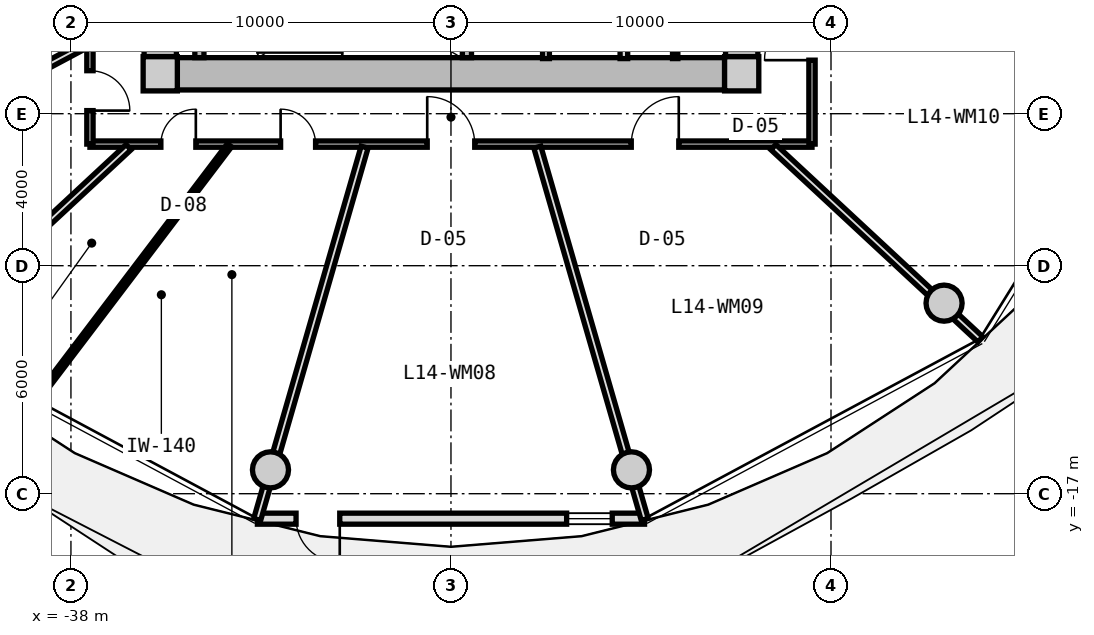
"""IFC4 building model, lengths in metres.
Left out: names, types, materials, properties, quantities, classifications, styles, units other than length and angle.
Written with IfcOpenShell. Run it as: python <this file> out.ifc"""

import sys

from ifc_helpers import new_model, si_unit, direction, frame, frame_2d, origin, origin_2d, place, context, subcontext, project, spatial, rectangle, circle, extrude, source, transform, mapped, element, fill, save


model = new_model("IFC4")
c1 = context("Model", 3, precision=1e-05, world=origin(), true_north=direction((0.0, 1.0)))
c2 = subcontext(c1, "Body", "Model", "MODEL_VIEW")
j1 = project(units=[si_unit("LENGTHUNIT", "METRE"), si_unit("PLANEANGLEUNIT", "RADIAN")], contexts=[c1])
p1 = place(None, origin())
s1 = spatial("IfcSite", under=j1, at=p1, CompositionType="ELEMENT")
p2 = place(p1, origin())
s2 = spatial("IfcBuilding", under=s1, at=p2, CompositionType="ELEMENT")
p3 = place(p2, frame((0.0, 0.0, 49.05)))
s3 = spatial("IfcBuildingStorey", under=s2, at=p3, CompositionType="ELEMENT", Elevation=49.05)
m1 = source(origin(), c2, "Body", "SweptSolid", [
    extrude(rectangle(XDim=0.9, YDim=0.9, at=origin_2d()), origin(), (0.0, 0.0, 1.0), 3.05),
])
for number, where, z_axis, x_axis in (
    (1, (-35.65, -5.95, 0.0), (0.0, 0.0, 1.0), (1.0, 0.0, 0.0)),
    (2, (-20.35, -5.95, 0.0), (0.0, 0.0, 1.0), (1.0, 0.0, 0.0)),
):
    element("IfcColumn", number, at=place(p3, frame(where, z_axis=z_axis, x_axis=x_axis)), inside=s3, PredefinedType="COLUMN", context=c2, shape_type="MappedRepresentation", body=[
        mapped(m1, transform((0.0, 0.0, 0.0), x_axis=(1.0, 0.0, 0.0), y_axis=(0.0, 1.0, 0.0), z_axis=(0.0, 0.0, 1.0), scale=1.0)),
    ])
m2 = source(origin(), c2, "Body", "SweptSolid", [
    extrude(rectangle(XDim=14.4, YDim=0.85, at=frame_2d((7.2, 0.0))), origin(), (0.0, 0.0, 1.0), 2.79),
])
p4 = place(p3, frame((-20.8, -5.95, 0.0), z_axis=(0.0, 0.0, 1.0), x_axis=(-1.0, 0.0, 0.0)))
e3 = element("IfcWall", 3, at=p4, inside=s3, PredefinedType="SHEAR", context=c2, shape_type="MappedRepresentation", body=[
    mapped(m2, transform((0.0, 0.0, 0.0), x_axis=(1.0, 0.0, 0.0), y_axis=(0.0, 1.0, 0.0), z_axis=(0.0, 0.0, 1.0), scale=1.0)),
])
m3 = source(origin(), c2, "Body", "SweptSolid", [
    extrude(rectangle(XDim=11.0, YDim=0.85, at=frame_2d((5.5, 0.0))), origin(), (0.0, 0.0, 1.0), 2.79),
])
p5 = place(p3, frame((-35.65, -5.5, 0.0), z_axis=(0.0, 0.0, 1.0), x_axis=(0.0, 1.0, 0.0)))
e4 = element("IfcWall", 4, at=p5, inside=s3, PredefinedType="SHEAR", context=c2, shape_type="MappedRepresentation", body=[
    mapped(m3, transform((0.0, 0.0, 0.0), x_axis=(1.0, 0.0, 0.0), y_axis=(0.0, 1.0, 0.0), z_axis=(0.0, 0.0, 1.0), scale=1.0)),
])
p6 = place(p5, frame((3.8, 0.0, 0.0)))
e5 = element("IfcOpeningElement", 5, at=p6, cuts=e4, PredefinedType="OPENING", context=c2, shape_type="SweptSolid", body=[
    extrude(rectangle(XDim=1.2, YDim=2.15, at=frame_2d((0.6, 1.075))), frame((0.0, 0.435, 0.0), z_axis=(0.0, -1.0, 0.0), x_axis=(1.0, 0.0, 0.0)), (0.0, 0.0, 1.0), 0.87),
])
p7 = place(p3, frame((-20.35, 5.5, 0.0), z_axis=(0.0, 0.0, 1.0), x_axis=(0.0, -1.0, 0.0)))
e6 = element("IfcWall", 6, at=p7, inside=s3, PredefinedType="SHEAR", context=c2, shape_type="MappedRepresentation", body=[
    mapped(m3, transform((0.0, 0.0, 0.0), x_axis=(1.0, 0.0, 0.0), y_axis=(0.0, 1.0, 0.0), z_axis=(0.0, 0.0, 1.0), scale=1.0)),
])
p8 = place(p7, frame((5.65, 0.0, 0.0)))
e7 = element("IfcOpeningElement", 7, at=p8, cuts=e6, PredefinedType="OPENING", context=c2, shape_type="SweptSolid", body=[
    extrude(rectangle(XDim=1.2, YDim=2.15, at=frame_2d((0.6, 1.075))), frame((0.0, 0.435, 0.0), z_axis=(0.0, -1.0, 0.0), x_axis=(1.0, 0.0, 0.0)), (0.0, 0.0, 1.0), 0.87),
])
m4 = source(origin(), c2, "Body", "SweptSolid", [
    extrude(circle(Radius=0.475, at=origin_2d()), origin(), (0.0, 0.0, 1.0), 3.05),
])
for number, where, z_axis, x_axis in (
    (8, (-32.749, -16.373, 0.0), (0.0, 0.0, 1.0), (1.0, 0.0, 0.0)),
    (9, (-23.251, -16.373, 0.0), (0.0, 0.0, 1.0), (1.0, 0.0, 0.0)),
    (10, (-15.025, -11.985, 0.0), (0.0, 0.0, 1.0), (1.0, 0.0, 0.0)),
):
    element("IfcColumn", number, at=place(p3, frame(where, z_axis=z_axis, x_axis=x_axis)), inside=s3, PredefinedType="COLUMN", context=c2, shape_type="MappedRepresentation", body=[
        mapped(m4, transform((0.0, 0.0, 0.0), x_axis=(1.0, 0.0, 0.0), y_axis=(0.0, 1.0, 0.0), z_axis=(0.0, 0.0, 1.0), scale=1.0)),
    ])
m5 = source(origin(), c2, "Body", "SweptSolid", [
    extrude(rectangle(XDim=10.187, YDim=0.29, at=frame_2d((5.094, 0.0))), origin(), (0.0, 0.0, 1.0), 2.79),
])
p9 = place(p3, frame((-22.906, -17.657, 0.0), z_axis=(0.0, 0.0, 1.0), x_axis=(-1.0, 0.0, 0.0)))
e11 = element("IfcWall", 11, at=p9, inside=s3, PredefinedType="SOLIDWALL", context=c2, shape_type="MappedRepresentation", body=[
    mapped(m5, transform((0.0, 0.0, 0.0), x_axis=(1.0, 0.0, 0.0), y_axis=(0.0, 1.0, 0.0), z_axis=(0.0, 0.0, 1.0), scale=1.0)),
])
p10 = place(p9, frame((8.02, 0.0, 0.0)))
e12 = element("IfcOpeningElement", 12, at=p10, cuts=e11, PredefinedType="OPENING", context=c2, shape_type="SweptSolid", body=[
    extrude(rectangle(XDim=1.15, YDim=2.25, at=frame_2d((0.575, 1.125))), frame((0.0, 0.155, 0.0), z_axis=(0.0, -1.0, 0.0), x_axis=(1.0, 0.0, 0.0)), (0.0, 0.0, 1.0), 0.31),
])
p11 = place(p9, frame((0.85, 0.0, 0.85)))
e13 = element("IfcOpeningElement", 13, at=p11, cuts=e11, PredefinedType="OPENING", context=c2, shape_type="SweptSolid", body=[
    extrude(rectangle(XDim=1.2, YDim=1.5, at=frame_2d((0.6, 0.75))), frame((0.0, 0.155, 0.0), z_axis=(0.0, -1.0, 0.0), x_axis=(1.0, 0.0, 0.0)), (0.0, 0.0, 1.0), 0.31),
])
m6 = source(origin(), c2, "Body", "SweptSolid", [
    extrude(rectangle(XDim=3.075, YDim=0.24, at=frame_2d((1.538, 0.0))), origin(), (0.0, 0.0, 1.0), 2.79),
])
for number, where, z_axis, x_axis in (
    (14, (-34.62, -5.525, 0.0), (0.0, 0.0, 1.0), (0.0, 1.0, 0.0)),
    (15, (-27.58, -5.525, 0.0), (0.0, 0.0, 1.0), (0.0, 1.0, 0.0)),
):
    element("IfcWall", number, at=place(p3, frame(where, z_axis=z_axis, x_axis=x_axis)), inside=s3, PredefinedType="PARTITIONING", context=c2, shape_type="MappedRepresentation", body=[
        mapped(m6, transform((0.0, 0.0, 0.0), x_axis=(1.0, 0.0, 0.0), y_axis=(0.0, 1.0, 0.0), z_axis=(0.0, 0.0, 1.0), scale=1.0)),
    ])
m7 = source(origin(), c2, "Body", "SweptSolid", [
    extrude(rectangle(XDim=3.8, YDim=0.2, at=frame_2d((1.9, 0.0))), origin(), (0.0, 0.0, 1.0), 2.775),
])
p12 = place(p3, frame((-23.45, -5.55, 0.0), z_axis=(0.0, 0.0, 1.0), x_axis=(0.0, 1.0, 0.0)))
e16 = element("IfcWall", 16, at=p12, inside=s3, PredefinedType="PARTITIONING", context=c2, shape_type="MappedRepresentation", body=[
    mapped(m7, transform((0.0, 0.0, 0.0), x_axis=(1.0, 0.0, 0.0), y_axis=(0.0, 1.0, 0.0), z_axis=(0.0, 0.0, 1.0), scale=1.0)),
])
m8 = source(origin(), c2, "Body", "SweptSolid", [
    extrude(rectangle(XDim=3.22, YDim=0.18, at=frame_2d((1.61, 0.0))), origin(), (0.0, 0.0, 1.0), 2.775),
])
p13 = place(p3, frame((-25.5, -5.55, 0.0), z_axis=(0.0, 0.0, 1.0), x_axis=(0.0, 1.0, 0.0)))
e17 = element("IfcWall", 17, at=p13, inside=s3, PredefinedType="PARTITIONING", context=c2, shape_type="MappedRepresentation", body=[
    mapped(m8, transform((0.0, 0.0, 0.0), x_axis=(1.0, 0.0, 0.0), y_axis=(0.0, 1.0, 0.0), z_axis=(0.0, 0.0, 1.0), scale=1.0)),
])
m9 = source(origin(), c2, "Body", "SweptSolid", [
    extrude(rectangle(XDim=3.8, YDim=0.14, at=frame_2d((1.9, 0.0))), origin(), (0.0, 0.0, 1.0), 2.775),
])
p14 = place(p3, frame((-22.1, -5.55, 0.0), z_axis=(0.0, 0.0, 1.0), x_axis=(0.0, 1.0, 0.0)))
e18 = element("IfcWall", 18, at=p14, inside=s3, PredefinedType="PARTITIONING", context=c2, shape_type="MappedRepresentation", body=[
    mapped(m9, transform((0.0, 0.0, 0.0), x_axis=(1.0, 0.0, 0.0), y_axis=(0.0, 1.0, 0.0), z_axis=(0.0, 0.0, 1.0), scale=1.0)),
])
m10 = source(origin(), c2, "Body", "SweptSolid", [
    extrude(rectangle(XDim=19.0, YDim=0.165, at=frame_2d((9.5, 0.0))), origin(), (0.0, 0.0, 1.0), 2.775),
])
p15 = place(p3, frame((-18.5, -7.8, 0.0), z_axis=(0.0, 0.0, 1.0), x_axis=(-1.0, 0.0, 0.0)))
e19 = element("IfcWall", 19, at=p15, inside=s3, PredefinedType="PARTITIONING", context=c2, shape_type="MappedRepresentation", body=[
    mapped(m10, transform((0.0, 0.0, 0.0), x_axis=(1.0, 0.0, 0.0), y_axis=(0.0, 1.0, 0.0), z_axis=(0.0, 0.0, 1.0), scale=1.0)),
])
p16 = place(p15, frame((16.214, 0.0, 0.0)))
e20 = element("IfcOpeningElement", 20, at=p16, cuts=e19, PredefinedType="OPENING", context=c2, shape_type="SweptSolid", body=[
    extrude(rectangle(XDim=0.92, YDim=2.1, at=frame_2d((0.46, 1.05))), frame((0.0, 0.093, 0.0), z_axis=(0.0, -1.0, 0.0), x_axis=(1.0, 0.0, 0.0)), (0.0, 0.0, 1.0), 0.185),
])
p17 = place(p15, frame((13.063, 0.0, 0.0)))
e21 = element("IfcOpeningElement", 21, at=p17, cuts=e19, PredefinedType="OPENING", context=c2, shape_type="SweptSolid", body=[
    extrude(rectangle(XDim=0.92, YDim=2.1, at=frame_2d((0.46, 1.05))), frame((0.0, 0.093, 0.0), z_axis=(0.0, -1.0, 0.0), x_axis=(1.0, 0.0, 0.0)), (0.0, 0.0, 1.0), 0.185),
])
p18 = place(p15, frame((8.875, 0.0, 0.0)))
e22 = element("IfcOpeningElement", 22, at=p18, cuts=e19, PredefinedType="OPENING", context=c2, shape_type="SweptSolid", body=[
    extrude(rectangle(XDim=1.25, YDim=2.2, at=frame_2d((0.625, 1.1))), frame((0.0, 0.093, 0.0), z_axis=(0.0, -1.0, 0.0), x_axis=(1.0, 0.0, 0.0)), (0.0, 0.0, 1.0), 0.185),
])
p19 = place(p15, frame((3.506, 0.0, 0.0)))
e23 = element("IfcOpeningElement", 23, at=p19, cuts=e19, PredefinedType="OPENING", context=c2, shape_type="SweptSolid", body=[
    extrude(rectangle(XDim=1.25, YDim=2.2, at=frame_2d((0.625, 1.1))), frame((0.0, 0.093, 0.0), z_axis=(0.0, -1.0, 0.0), x_axis=(1.0, 0.0, 0.0)), (0.0, 0.0, 1.0), 0.185),
])
m11 = source(origin(), c2, "Body", "SweptSolid", [
    extrude(rectangle(XDim=15.6, YDim=0.165, at=frame_2d((7.8, 0.0))), origin(), (0.0, 0.0, 1.0), 2.775),
])
p20 = place(p3, frame((-37.5, -7.8, 0.0), z_axis=(0.0, 0.0, 1.0), x_axis=(0.0, 1.0, 0.0)))
e24 = element("IfcWall", 24, at=p20, inside=s3, PredefinedType="PARTITIONING", context=c2, shape_type="MappedRepresentation", body=[
    mapped(m11, transform((0.0, 0.0, 0.0), x_axis=(1.0, 0.0, 0.0), y_axis=(0.0, 1.0, 0.0), z_axis=(0.0, 0.0, 1.0), scale=1.0)),
])
p21 = place(p20, frame((13.623, 0.0, 0.0)))
e25 = element("IfcOpeningElement", 25, at=p21, cuts=e24, PredefinedType="OPENING", context=c2, shape_type="SweptSolid", body=[
    extrude(rectangle(XDim=1.05, YDim=2.15, at=frame_2d((0.525, 1.075))), frame((0.0, 0.093, 0.0), z_axis=(0.0, -1.0, 0.0), x_axis=(1.0, 0.0, 0.0)), (0.0, 0.0, 1.0), 0.185),
])
p22 = place(p20, frame((11.018, 0.0, 0.0)))
e26 = element("IfcOpeningElement", 26, at=p22, cuts=e24, PredefinedType="OPENING", context=c2, shape_type="SweptSolid", body=[
    extrude(rectangle(XDim=1.05, YDim=2.15, at=frame_2d((0.525, 1.075))), frame((0.0, 0.093, 0.0), z_axis=(0.0, -1.0, 0.0), x_axis=(1.0, 0.0, 0.0)), (0.0, 0.0, 1.0), 0.185),
])
p23 = place(p20, frame((8.467, 0.0, 0.0)))
e27 = element("IfcOpeningElement", 27, at=p23, cuts=e24, PredefinedType="OPENING", context=c2, shape_type="SweptSolid", body=[
    extrude(rectangle(XDim=1.05, YDim=2.15, at=frame_2d((0.525, 1.075))), frame((0.0, 0.093, 0.0), z_axis=(0.0, -1.0, 0.0), x_axis=(1.0, 0.0, 0.0)), (0.0, 0.0, 1.0), 0.185),
])
p24 = place(p20, frame((6.035, 0.0, 0.0)))
e28 = element("IfcOpeningElement", 28, at=p24, cuts=e24, PredefinedType="OPENING", context=c2, shape_type="SweptSolid", body=[
    extrude(rectangle(XDim=1.05, YDim=2.15, at=frame_2d((0.525, 1.075))), frame((0.0, 0.093, 0.0), z_axis=(0.0, -1.0, 0.0), x_axis=(1.0, 0.0, 0.0)), (0.0, 0.0, 1.0), 0.185),
])
p25 = place(p20, frame((3.489, 0.0, 0.0)))
e29 = element("IfcOpeningElement", 29, at=p25, cuts=e24, PredefinedType="OPENING", context=c2, shape_type="SweptSolid", body=[
    extrude(rectangle(XDim=1.05, YDim=2.15, at=frame_2d((0.525, 1.075))), frame((0.0, 0.093, 0.0), z_axis=(0.0, -1.0, 0.0), x_axis=(1.0, 0.0, 0.0)), (0.0, 0.0, 1.0), 0.185),
])
p26 = place(p20, frame((0.882, 0.0, 0.0)))
e30 = element("IfcOpeningElement", 30, at=p26, cuts=e24, PredefinedType="OPENING", context=c2, shape_type="SweptSolid", body=[
    extrude(rectangle(XDim=1.05, YDim=2.15, at=frame_2d((0.525, 1.075))), frame((0.0, 0.093, 0.0), z_axis=(0.0, -1.0, 0.0), x_axis=(1.0, 0.0, 0.0)), (0.0, 0.0, 1.0), 0.185),
])
p27 = place(p3, frame((-18.5, 7.8, 0.0), z_axis=(0.0, 0.0, 1.0), x_axis=(0.0, -1.0, 0.0)))
e31 = element("IfcWall", 31, at=p27, inside=s3, PredefinedType="PARTITIONING", context=c2, shape_type="MappedRepresentation", body=[
    mapped(m11, transform((0.0, 0.0, 0.0), x_axis=(1.0, 0.0, 0.0), y_axis=(0.0, 1.0, 0.0), z_axis=(0.0, 0.0, 1.0), scale=1.0)),
])
p28 = place(p27, frame((12.141, 0.0, 0.0)))
e32 = element("IfcOpeningElement", 32, at=p28, cuts=e31, PredefinedType="OPENING", context=c2, shape_type="SweptSolid", body=[
    extrude(rectangle(XDim=1.25, YDim=2.2, at=frame_2d((0.625, 1.1))), frame((0.0, 0.093, 0.0), z_axis=(0.0, -1.0, 0.0), x_axis=(1.0, 0.0, 0.0)), (0.0, 0.0, 1.0), 0.185),
])
p29 = place(p27, frame((7.175, 0.0, 0.0)))
e33 = element("IfcOpeningElement", 33, at=p29, cuts=e31, PredefinedType="OPENING", context=c2, shape_type="SweptSolid", body=[
    extrude(rectangle(XDim=1.25, YDim=2.2, at=frame_2d((0.625, 1.1))), frame((0.0, 0.093, 0.0), z_axis=(0.0, -1.0, 0.0), x_axis=(1.0, 0.0, 0.0)), (0.0, 0.0, 1.0), 0.185),
])
p30 = place(p27, frame((2.826, 0.0, 0.0)))
e34 = element("IfcOpeningElement", 34, at=p30, cuts=e31, PredefinedType="OPENING", context=c2, shape_type="SweptSolid", body=[
    extrude(rectangle(XDim=1.05, YDim=2.15, at=frame_2d((0.525, 1.075))), frame((0.0, 0.093, 0.0), z_axis=(0.0, -1.0, 0.0), x_axis=(1.0, 0.0, 0.0)), (0.0, 0.0, 1.0), 0.185),
])
p31 = place(p27, frame((0.881, 0.0, 0.0)))
e35 = element("IfcOpeningElement", 35, at=p31, cuts=e31, PredefinedType="OPENING", context=c2, shape_type="SweptSolid", body=[
    extrude(rectangle(XDim=1.05, YDim=2.15, at=frame_2d((0.525, 1.075))), frame((0.0, 0.093, 0.0), z_axis=(0.0, -1.0, 0.0), x_axis=(1.0, 0.0, 0.0)), (0.0, 0.0, 1.0), 0.185),
])
m12 = source(origin(), c2, "Body", "SweptSolid", [
    extrude(rectangle(XDim=7.435, YDim=0.19, at=frame_2d((3.717, 0.0))), origin(), (0.0, 0.0, 1.0), 2.225),
])
p32 = place(p3, frame((-36.483, -7.88, 0.0), z_axis=(0.0, 0.0, 1.0), x_axis=(-0.732651956848, -0.680603489652, 0.0)))
e36 = element("IfcWall", 36, at=p32, inside=s3, PredefinedType="PARTITIONING", context=c2, shape_type="MappedRepresentation", body=[
    mapped(m12, transform((0.0, 0.0, 0.0), x_axis=(1.0, 0.0, 0.0), y_axis=(0.0, 1.0, 0.0), z_axis=(0.0, 0.0, 1.0), scale=1.0)),
])
m13 = source(origin(), c2, "Body", "SweptSolid", [
    extrude(rectangle(XDim=7.873, YDim=0.19, at=frame_2d((3.937, 0.0))), origin(), (0.0, 0.0, 1.0), 2.775),
])
p33 = place(p3, frame((-37.53, -5.138, 0.0), z_axis=(0.0, 0.0, 1.0), x_axis=(-0.882666052726, -0.470000680175, 0.0)))
e37 = element("IfcWall", 37, at=p33, inside=s3, PredefinedType="PARTITIONING", context=c2, shape_type="MappedRepresentation", body=[
    mapped(m13, transform((0.0, 0.0, 0.0), x_axis=(1.0, 0.0, 0.0), y_axis=(0.0, 1.0, 0.0), z_axis=(0.0, 0.0, 1.0), scale=1.0)),
])
m14 = source(origin(), c2, "Body", "SweptSolid", [
    extrude(rectangle(XDim=10.196, YDim=0.19, at=frame_2d((5.098, 0.0))), origin(), (0.0, 0.0, 1.0), 2.225),
])
p34 = place(p3, frame((-30.273, -7.88, 0.0), z_axis=(0.0, 0.0, 1.0), x_axis=(-0.277136420347, -0.960830580549, 0.0)))
e38 = element("IfcWall", 38, at=p34, inside=s3, PredefinedType="PARTITIONING", context=c2, shape_type="MappedRepresentation", body=[
    mapped(m14, transform((0.0, 0.0, 0.0), x_axis=(1.0, 0.0, 0.0), y_axis=(0.0, 1.0, 0.0), z_axis=(0.0, 0.0, 1.0), scale=1.0)),
])
m15 = source(origin(), c2, "Body", "SweptSolid", [
    extrude(rectangle(XDim=8.436, YDim=0.14, at=frame_2d((4.218, 0.0))), origin(), (0.0, 0.0, 1.0), 2.775),
])
p35 = place(p3, frame((-33.828, -7.83, 0.0), z_axis=(0.0, 0.0, 1.0), x_axis=(-0.604486552388, -0.796615345058, 0.0)))
e39 = element("IfcWall", 39, at=p35, inside=s3, PredefinedType="PARTITIONING", context=c2, shape_type="MappedRepresentation", body=[
    mapped(m15, transform((0.0, 0.0, 0.0), x_axis=(1.0, 0.0, 0.0), y_axis=(0.0, 1.0, 0.0), z_axis=(0.0, 0.0, 1.0), scale=1.0)),
])
p36 = place(p3, frame((-25.727, -7.88, 0.0), z_axis=(0.0, 0.0, 1.0), x_axis=(0.277136420347, -0.960830580549, 0.0)))
e40 = element("IfcWall", 40, at=p36, inside=s3, PredefinedType="PARTITIONING", context=c2, shape_type="MappedRepresentation", body=[
    mapped(m14, transform((0.0, 0.0, 0.0), x_axis=(1.0, 0.0, 0.0), y_axis=(0.0, 1.0, 0.0), z_axis=(0.0, 0.0, 1.0), scale=1.0)),
])
p37 = place(p3, frame((-19.517, -7.88, 0.0), z_axis=(0.0, 0.0, 1.0), x_axis=(0.732651956848, -0.680603489652, 0.0)))
e41 = element("IfcWall", 41, at=p37, inside=s3, PredefinedType="PARTITIONING", context=c2, shape_type="MappedRepresentation", body=[
    mapped(m12, transform((0.0, 0.0, 0.0), x_axis=(1.0, 0.0, 0.0), y_axis=(0.0, 1.0, 0.0), z_axis=(0.0, 0.0, 1.0), scale=1.0)),
])
m16 = source(origin(), c2, "Body", "SweptSolid", [
    extrude(rectangle(XDim=1.15, YDim=2.25, at=frame_2d((0.575, 1.125))), frame((0.0, 0.025, 0.0), z_axis=(0.0, -1.0, 0.0), x_axis=(1.0, 0.0, 0.0)), (0.0, 0.0, 1.0), 0.05),
])
p38 = place(p10, origin())
e42 = element("IfcDoor", 42, at=p38, inside=s3, OperationType="SINGLE_SWING_LEFT", PredefinedType="DOOR", context=c2, shape_type="MappedRepresentation", body=[
    mapped(m16, transform((0.0, 0.0, 0.0), x_axis=(1.0, 0.0, 0.0), y_axis=(0.0, 1.0, 0.0), z_axis=(0.0, 0.0, 1.0), scale=1.0)),
])
fill(e12, e42)
m17 = source(origin(), c2, "Body", "SweptSolid", [
    extrude(rectangle(XDim=1.2, YDim=1.5, at=frame_2d((0.6, 0.75))), frame((0.0, 0.03, 0.0), z_axis=(0.0, -1.0, 0.0), x_axis=(1.0, 0.0, 0.0)), (0.0, 0.0, 1.0), 0.06),
])
p39 = place(p11, origin())
e43 = element("IfcWindow", 43, at=p39, inside=s3, PartitioningType="SINGLE_PANEL", PredefinedType="WINDOW", context=c2, shape_type="MappedRepresentation", body=[
    mapped(m17, transform((0.0, 0.0, 0.0), x_axis=(1.0, 0.0, 0.0), y_axis=(0.0, 1.0, 0.0), z_axis=(0.0, 0.0, 1.0), scale=1.0)),
])
fill(e13, e43)
m18 = source(origin(), c2, "Body", "SweptSolid", [
    extrude(rectangle(XDim=1.05, YDim=2.15, at=frame_2d((0.525, 1.075))), frame((0.0, 0.025, 0.0), z_axis=(0.0, -1.0, 0.0), x_axis=(1.0, 0.0, 0.0)), (0.0, 0.0, 1.0), 0.05),
])
p40 = place(p26, frame((1.05, 0.0, 0.0), z_axis=(0.0, 0.0, 1.0), x_axis=(-1.0, 0.0, 0.0)))
e44 = element("IfcDoor", 44, at=p40, inside=s3, OperationType="SINGLE_SWING_RIGHT", PredefinedType="DOOR", context=c2, shape_type="MappedRepresentation", body=[
    mapped(m18, transform((0.0, 0.0, 0.0), x_axis=(1.0, 0.0, 0.0), y_axis=(0.0, 1.0, 0.0), z_axis=(0.0, 0.0, 1.0), scale=1.0)),
])
fill(e30, e44)
m19 = source(origin(), c2, "Body", "SweptSolid", [
    extrude(rectangle(XDim=0.92, YDim=2.1, at=frame_2d((0.46, 1.05))), frame((0.0, 0.025, 0.0), z_axis=(0.0, -1.0, 0.0), x_axis=(1.0, 0.0, 0.0)), (0.0, 0.0, 1.0), 0.05),
])
p41 = place(p16, frame((0.92, 0.0, 0.0), z_axis=(0.0, 0.0, 1.0), x_axis=(-1.0, 0.0, 0.0)))
e45 = element("IfcDoor", 45, at=p41, inside=s3, OperationType="SINGLE_SWING_RIGHT", PredefinedType="DOOR", context=c2, shape_type="MappedRepresentation", body=[
    mapped(m19, transform((0.0, 0.0, 0.0), x_axis=(1.0, 0.0, 0.0), y_axis=(0.0, 1.0, 0.0), z_axis=(0.0, 0.0, 1.0), scale=1.0)),
])
fill(e20, e45)
p42 = place(p17, frame((0.92, 0.0, 0.0), z_axis=(0.0, 0.0, 1.0), x_axis=(-1.0, 0.0, 0.0)))
e46 = element("IfcDoor", 46, at=p42, inside=s3, OperationType="SINGLE_SWING_LEFT", PredefinedType="DOOR", context=c2, shape_type="MappedRepresentation", body=[
    mapped(m19, transform((0.0, 0.0, 0.0), x_axis=(1.0, 0.0, 0.0), y_axis=(0.0, 1.0, 0.0), z_axis=(0.0, 0.0, 1.0), scale=1.0)),
])
fill(e21, e46)
m20 = source(origin(), c2, "Body", "SweptSolid", [
    extrude(rectangle(XDim=1.25, YDim=2.2, at=frame_2d((0.625, 1.1))), frame((0.0, 0.025, 0.0), z_axis=(0.0, -1.0, 0.0), x_axis=(1.0, 0.0, 0.0)), (0.0, 0.0, 1.0), 0.05),
])
p43 = place(p18, frame((1.25, 0.0, 0.0), z_axis=(0.0, 0.0, 1.0), x_axis=(-1.0, 0.0, 0.0)))
e47 = element("IfcDoor", 47, at=p43, inside=s3, OperationType="SINGLE_SWING_LEFT", PredefinedType="DOOR", context=c2, shape_type="MappedRepresentation", body=[
    mapped(m20, transform((0.0, 0.0, 0.0), x_axis=(1.0, 0.0, 0.0), y_axis=(0.0, 1.0, 0.0), z_axis=(0.0, 0.0, 1.0), scale=1.0)),
])
fill(e22, e47)
p44 = place(p19, frame((1.25, 0.0, 0.0), z_axis=(0.0, 0.0, 1.0), x_axis=(-1.0, 0.0, 0.0)))
e48 = element("IfcDoor", 48, at=p44, inside=s3, OperationType="SINGLE_SWING_RIGHT", PredefinedType="DOOR", context=c2, shape_type="MappedRepresentation", body=[
    mapped(m20, transform((0.0, 0.0, 0.0), x_axis=(1.0, 0.0, 0.0), y_axis=(0.0, 1.0, 0.0), z_axis=(0.0, 0.0, 1.0), scale=1.0)),
])
fill(e23, e48)
p45 = place(p28, frame((1.25, 0.0, 0.0), z_axis=(0.0, 0.0, 1.0), x_axis=(-1.0, 0.0, 0.0)))
e49 = element("IfcDoor", 49, at=p45, inside=s3, OperationType="SINGLE_SWING_LEFT", PredefinedType="DOOR", context=c2, shape_type="MappedRepresentation", body=[
    mapped(m20, transform((0.0, 0.0, 0.0), x_axis=(1.0, 0.0, 0.0), y_axis=(0.0, 1.0, 0.0), z_axis=(0.0, 0.0, 1.0), scale=1.0)),
])
fill(e32, e49)
save(model, sys.argv[1])
